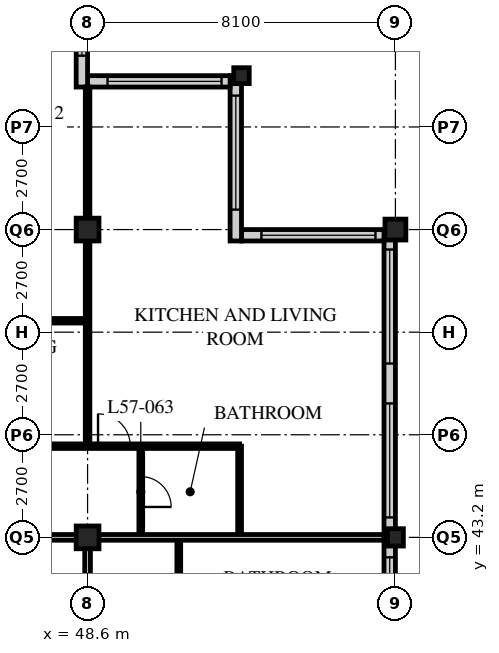
"""IFC4 building model, lengths in metres.
Left out: names, types, materials, properties, quantities, classifications, styles, units other than length and angle.
Written with IfcOpenShell. Run it as: python <this file> out.ifc"""

import sys

from ifc_helpers import new_model, si_unit, direction, frame, frame_2d, origin, origin_2d, place, context, subcontext, project, spatial, rectangle, hollow_rectangle, i_section, extrude, element, fill, save


model = new_model("IFC4")
c1 = context("Model", 3, precision=1e-05, world=origin(), true_north=direction((0.0, 1.0)))
c2 = subcontext(c1, "Body", "Model", "MODEL_VIEW")
j1 = project(units=[si_unit("LENGTHUNIT", "METRE"), si_unit("PLANEANGLEUNIT", "RADIAN")], contexts=[c1])
p1 = place(None, origin())
s1 = spatial("IfcSite", under=j1, at=p1, CompositionType="ELEMENT")
p2 = place(p1, origin())
s2 = spatial("IfcBuilding", under=s1, at=p2, CompositionType="ELEMENT")
p3 = place(p2, frame((0.0, 0.0, 220.8)))
s3 = spatial("IfcBuildingStorey", under=s2, at=p3, CompositionType="ELEMENT", Elevation=220.8)
for number, where, z_axis, x_axis in (
    (1, (48.6, 43.2, 0.0), (0.0, 0.0, 1.0), (1.0, 0.0, 0.0)),
    (2, (48.6, 51.3, 0.0), (0.0, 0.0, 1.0), (1.0, 0.0, 0.0)),
):
    element("IfcColumn", number, at=place(p3, frame(where, z_axis=z_axis, x_axis=x_axis)), inside=s3, PredefinedType="COLUMN", context=c2, shape_type="SweptSolid", body=[
        extrude(hollow_rectangle(XDim=0.6, YDim=0.6, WallThickness=0.05, at=origin_2d()), origin(), (0.0, 0.0, 1.0), 3.6),
    ])
p4 = place(p3, frame((52.65, 55.35, 0.0), z_axis=(0.0, 0.0, 1.0), x_axis=(1.0, 0.0, 0.0)))
e3 = element("IfcColumn", 3, at=p4, inside=s3, PredefinedType="COLUMN", context=c2, shape_type="SweptSolid", body=[
    extrude(i_section(OverallWidth=0.407, OverallDepth=0.419, WebThickness=0.031, FlangeThickness=0.049, FilletRadius=0.015, at=origin_2d()), origin(), (0.0, 0.0, 1.0), 3.6),
])
p5 = place(p3, frame((56.7, 43.2, 0.0), z_axis=(0.0, 0.0, 1.0), x_axis=(1.0, 0.0, 0.0)))
e4 = element("IfcColumn", 4, at=p5, inside=s3, PredefinedType="COLUMN", context=c2, shape_type="SweptSolid", body=[
    extrude(i_section(OverallWidth=0.418, OverallDepth=0.456, WebThickness=0.042, FlangeThickness=0.067, FilletRadius=0.015, at=origin_2d()), origin(), (0.0, 0.0, 1.0), 3.6),
])
p6 = place(p3, frame((56.7, 51.3, 0.0), z_axis=(0.0, 0.0, 1.0), x_axis=(1.0, 0.0, 0.0)))
e5 = element("IfcColumn", 5, at=p6, inside=s3, PredefinedType="COLUMN", context=c2, shape_type="SweptSolid", body=[
    extrude(hollow_rectangle(XDim=0.55, YDim=0.55, WallThickness=0.045, at=origin_2d()), origin(), (0.0, 0.0, 1.0), 3.6),
])
p7 = place(p3, frame((56.55, 19.2, 0.0), z_axis=(0.0, 0.0, 1.0), x_axis=(0.0, 1.0, 0.0)))
e6 = element("IfcWall", 6, at=p7, inside=s3, PredefinedType="SOLIDWALL", context=c2, shape_type="SweptSolid", body=[
    extrude(rectangle(XDim=32.1, YDim=0.3, at=frame_2d((16.05, 0.0))), origin(), (0.0, 0.0, 1.0), 3.39),
])
p8 = place(p7, frame((0.225, 0.0, 0.6)))
e7 = element("IfcOpeningElement", 7, at=p8, cuts=e6, PredefinedType="OPENING", context=c2, shape_type="SweptSolid", body=[
    extrude(rectangle(XDim=3.0, YDim=2.0, at=frame_2d((1.5, 1.0))), frame((0.0, 0.16, 0.0), z_axis=(0.0, -1.0, 0.0), x_axis=(1.0, 0.0, 0.0)), (0.0, 0.0, 1.0), 0.32),
])
p9 = place(p7, frame((4.275, 0.0, 0.6)))
e8 = element("IfcOpeningElement", 8, at=p9, cuts=e6, PredefinedType="OPENING", context=c2, shape_type="SweptSolid", body=[
    extrude(rectangle(XDim=3.0, YDim=2.0, at=frame_2d((1.5, 1.0))), frame((0.0, 0.16, 0.0), z_axis=(0.0, -1.0, 0.0), x_axis=(1.0, 0.0, 0.0)), (0.0, 0.0, 1.0), 0.32),
])
p10 = place(p7, frame((8.325, 0.0, 0.6)))
e9 = element("IfcOpeningElement", 9, at=p10, cuts=e6, PredefinedType="OPENING", context=c2, shape_type="SweptSolid", body=[
    extrude(rectangle(XDim=3.0, YDim=2.0, at=frame_2d((1.5, 1.0))), frame((0.0, 0.16, 0.0), z_axis=(0.0, -1.0, 0.0), x_axis=(1.0, 0.0, 0.0)), (0.0, 0.0, 1.0), 0.32),
])
p11 = place(p7, frame((12.375, 0.0, 0.6)))
e10 = element("IfcOpeningElement", 10, at=p11, cuts=e6, PredefinedType="OPENING", context=c2, shape_type="SweptSolid", body=[
    extrude(rectangle(XDim=3.0, YDim=2.0, at=frame_2d((1.5, 1.0))), frame((0.0, 0.16, 0.0), z_axis=(0.0, -1.0, 0.0), x_axis=(1.0, 0.0, 0.0)), (0.0, 0.0, 1.0), 0.32),
])
p12 = place(p7, frame((16.425, 0.0, 0.6)))
e11 = element("IfcOpeningElement", 11, at=p12, cuts=e6, PredefinedType="OPENING", context=c2, shape_type="SweptSolid", body=[
    extrude(rectangle(XDim=3.0, YDim=2.0, at=frame_2d((1.5, 1.0))), frame((0.0, 0.16, 0.0), z_axis=(0.0, -1.0, 0.0), x_axis=(1.0, 0.0, 0.0)), (0.0, 0.0, 1.0), 0.32),
])
p13 = place(p7, frame((20.475, 0.0, 0.6)))
e12 = element("IfcOpeningElement", 12, at=p13, cuts=e6, PredefinedType="OPENING", context=c2, shape_type="SweptSolid", body=[
    extrude(rectangle(XDim=3.0, YDim=2.0, at=frame_2d((1.5, 1.0))), frame((0.0, 0.16, 0.0), z_axis=(0.0, -1.0, 0.0), x_axis=(1.0, 0.0, 0.0)), (0.0, 0.0, 1.0), 0.32),
])
p14 = place(p7, frame((24.525, 0.0, 0.6)))
e13 = element("IfcOpeningElement", 13, at=p14, cuts=e6, PredefinedType="OPENING", context=c2, shape_type="SweptSolid", body=[
    extrude(rectangle(XDim=3.0, YDim=2.0, at=frame_2d((1.5, 1.0))), frame((0.0, 0.16, 0.0), z_axis=(0.0, -1.0, 0.0), x_axis=(1.0, 0.0, 0.0)), (0.0, 0.0, 1.0), 0.32),
])
p15 = place(p7, frame((28.575, 0.0, 0.6)))
e14 = element("IfcOpeningElement", 14, at=p15, cuts=e6, PredefinedType="OPENING", context=c2, shape_type="SweptSolid", body=[
    extrude(rectangle(XDim=3.0, YDim=2.0, at=frame_2d((1.5, 1.0))), frame((0.0, 0.16, 0.0), z_axis=(0.0, -1.0, 0.0), x_axis=(1.0, 0.0, 0.0)), (0.0, 0.0, 1.0), 0.32),
])
p16 = place(p3, frame((56.4, 51.15, 0.0), z_axis=(0.0, 0.0, 1.0), x_axis=(-1.0, 0.0, 0.0)))
e15 = element("IfcWall", 15, at=p16, inside=s3, PredefinedType="SOLIDWALL", context=c2, shape_type="SweptSolid", body=[
    extrude(rectangle(XDim=3.75, YDim=0.3, at=frame_2d((1.875, 0.0))), origin(), (0.0, 0.0, 1.0), 3.39),
])
p17 = place(p16, frame((0.225, 0.0, 0.6)))
e16 = element("IfcOpeningElement", 16, at=p17, cuts=e15, PredefinedType="OPENING", context=c2, shape_type="SweptSolid", body=[
    extrude(rectangle(XDim=3.0, YDim=2.0, at=frame_2d((1.5, 1.0))), frame((0.0, 0.16, 0.0), z_axis=(0.0, -1.0, 0.0), x_axis=(1.0, 0.0, 0.0)), (0.0, 0.0, 1.0), 0.32),
])
p18 = place(p3, frame((52.5, 51.0, 0.0), z_axis=(0.0, 0.0, 1.0), x_axis=(0.0, 1.0, 0.0)))
e17 = element("IfcWall", 17, at=p18, inside=s3, PredefinedType="SOLIDWALL", context=c2, shape_type="SweptSolid", body=[
    extrude(rectangle(XDim=4.35, YDim=0.3, at=frame_2d((2.175, 0.0))), origin(), (0.0, 0.0, 1.0), 3.39),
])
p19 = place(p18, frame((0.825, 0.0, 0.6)))
e18 = element("IfcOpeningElement", 18, at=p19, cuts=e17, PredefinedType="OPENING", context=c2, shape_type="SweptSolid", body=[
    extrude(rectangle(XDim=3.0, YDim=2.0, at=frame_2d((1.5, 1.0))), frame((0.0, 0.16, 0.0), z_axis=(0.0, -1.0, 0.0), x_axis=(1.0, 0.0, 0.0)), (0.0, 0.0, 1.0), 0.32),
])
p20 = place(p3, frame((52.35, 55.2, 0.0), z_axis=(0.0, 0.0, 1.0), x_axis=(-1.0, 0.0, 0.0)))
e19 = element("IfcWall", 19, at=p20, inside=s3, PredefinedType="SOLIDWALL", context=c2, shape_type="SweptSolid", body=[
    extrude(rectangle(XDim=3.75, YDim=0.3, at=frame_2d((1.875, 0.0))), origin(), (0.0, 0.0, 1.0), 3.39),
])
p21 = place(p20, frame((0.225, 0.0, 0.6)))
e20 = element("IfcOpeningElement", 20, at=p21, cuts=e19, PredefinedType="OPENING", context=c2, shape_type="SweptSolid", body=[
    extrude(rectangle(XDim=3.0, YDim=2.0, at=frame_2d((1.5, 1.0))), frame((0.0, 0.16, 0.0), z_axis=(0.0, -1.0, 0.0), x_axis=(1.0, 0.0, 0.0)), (0.0, 0.0, 1.0), 0.32),
])
p22 = place(p3, frame((48.45, 55.05, 0.0), z_axis=(0.0, 0.0, 1.0), x_axis=(0.0, 1.0, 0.0)))
e21 = element("IfcWall", 21, at=p22, inside=s3, PredefinedType="SOLIDWALL", context=c2, shape_type="SweptSolid", body=[
    extrude(rectangle(XDim=4.35, YDim=0.3, at=frame_2d((2.175, 0.0))), origin(), (0.0, 0.0, 1.0), 3.39),
])
p23 = place(p22, frame((0.825, 0.0, 0.6)))
e22 = element("IfcOpeningElement", 22, at=p23, cuts=e21, PredefinedType="OPENING", context=c2, shape_type="SweptSolid", body=[
    extrude(rectangle(XDim=3.0, YDim=2.0, at=frame_2d((1.5, 1.0))), frame((0.0, 0.16, 0.0), z_axis=(0.0, -1.0, 0.0), x_axis=(1.0, 0.0, 0.0)), (0.0, 0.0, 1.0), 0.32),
])
p24 = place(p3, frame((12.15, 43.2, 0.0), z_axis=(0.0, 0.0, 1.0), x_axis=(1.0, 0.0, 0.0)))
e23 = element("IfcWall", 23, at=p24, inside=s3, PredefinedType="PARTITIONING", context=c2, shape_type="SweptSolid", body=[
    extrude(rectangle(XDim=36.45, YDim=0.15, at=frame_2d((18.225, 0.0))), origin(), (0.0, 0.0, 1.0), 2.628),
])
p25 = place(p24, frame((4.95, 0.0, 0.0)))
e24 = element("IfcOpeningElement", 24, at=p25, cuts=e23, PredefinedType="OPENING", context=c2, shape_type="SweptSolid", body=[
    extrude(rectangle(XDim=1.0, YDim=2.1, at=frame_2d((0.5, 1.05))), frame((0.0, 0.085, 0.0), z_axis=(0.0, -1.0, 0.0), x_axis=(1.0, 0.0, 0.0)), (0.0, 0.0, 1.0), 0.17),
])
p26 = place(p24, frame((25.0, 0.0, 0.0)))
e25 = element("IfcOpeningElement", 25, at=p26, cuts=e23, PredefinedType="OPENING", context=c2, shape_type="SweptSolid", body=[
    extrude(rectangle(XDim=1.0, YDim=2.1, at=frame_2d((0.5, 1.05))), frame((0.0, 0.085, 0.0), z_axis=(0.0, -1.0, 0.0), x_axis=(1.0, 0.0, 0.0)), (0.0, 0.0, 1.0), 0.17),
])
p27 = place(p24, frame((30.7, 0.0, 0.0)))
e26 = element("IfcOpeningElement", 26, at=p27, cuts=e23, PredefinedType="OPENING", context=c2, shape_type="SweptSolid", body=[
    extrude(rectangle(XDim=1.0, YDim=2.1, at=frame_2d((0.5, 1.05))), frame((0.0, 0.085, 0.0), z_axis=(0.0, -1.0, 0.0), x_axis=(1.0, 0.0, 0.0)), (0.0, 0.0, 1.0), 0.17),
])
p28 = place(p24, frame((33.925, 0.0, 0.0)))
e27 = element("IfcOpeningElement", 27, at=p28, cuts=e23, PredefinedType="OPENING", context=c2, shape_type="SweptSolid", body=[
    extrude(rectangle(XDim=1.0, YDim=2.1, at=frame_2d((0.5, 1.05))), frame((0.0, 0.085, 0.0), z_axis=(0.0, -1.0, 0.0), x_axis=(1.0, 0.0, 0.0)), (0.0, 0.0, 1.0), 0.17),
])
p29 = place(p24, frame((1.525, 0.0, 0.0)))
e28 = element("IfcOpeningElement", 28, at=p29, cuts=e23, PredefinedType="OPENING", context=c2, shape_type="SweptSolid", body=[
    extrude(rectangle(XDim=1.0, YDim=2.1, at=frame_2d((0.5, 1.05))), frame((0.0, 0.085, 0.0), z_axis=(0.0, -1.0, 0.0), x_axis=(1.0, 0.0, 0.0)), (0.0, 0.0, 1.0), 0.17),
])
p30 = place(p3, frame((48.6, 18.9, 0.0), z_axis=(0.0, 0.0, 1.0), x_axis=(0.0, 1.0, 0.0)))
e29 = element("IfcWall", 29, at=p30, inside=s3, PredefinedType="PARTITIONING", context=c2, shape_type="SweptSolid", body=[
    extrude(rectangle(XDim=24.3, YDim=0.15, at=frame_2d((12.15, 0.0))), origin(), (0.0, 0.0, 1.0), 2.628),
])
p31 = place(p30, frame((0.9, 0.0, 0.0)))
e30 = element("IfcOpeningElement", 30, at=p31, cuts=e29, PredefinedType="OPENING", context=c2, shape_type="SweptSolid", body=[
    extrude(rectangle(XDim=1.0, YDim=2.1, at=frame_2d((0.5, 1.05))), frame((0.0, 0.085, 0.0), z_axis=(0.0, -1.0, 0.0), x_axis=(1.0, 0.0, 0.0)), (0.0, 0.0, 1.0), 0.17),
])
p32 = place(p30, frame((20.95, 0.0, 0.0)))
e31 = element("IfcOpeningElement", 31, at=p32, cuts=e29, PredefinedType="OPENING", context=c2, shape_type="SweptSolid", body=[
    extrude(rectangle(XDim=1.0, YDim=2.1, at=frame_2d((0.5, 1.05))), frame((0.0, 0.085, 0.0), z_axis=(0.0, -1.0, 0.0), x_axis=(1.0, 0.0, 0.0)), (0.0, 0.0, 1.0), 0.17),
])
p33 = place(p3, frame((51.0, 41.0, 0.0), z_axis=(0.0, 0.0, 1.0), x_axis=(0.0, 1.0, 0.0)))
e32 = element("IfcWall", 32, at=p33, inside=s3, PredefinedType="PARTITIONING", context=c2, shape_type="SweptSolid", body=[
    extrude(rectangle(XDim=2.2, YDim=0.1, at=frame_2d((1.1, 0.0))), origin(), (0.0, 0.0, 1.0), 3.39),
])
p34 = place(p3, frame((44.55, 45.6, 0.0), z_axis=(0.0, 0.0, 1.0), x_axis=(1.0, 0.0, 0.0)))
e33 = element("IfcWall", 33, at=p34, inside=s3, PredefinedType="PARTITIONING", context=c2, shape_type="SweptSolid", body=[
    extrude(rectangle(XDim=8.05, YDim=0.12, at=frame_2d((4.025, 0.0))), origin(), (0.0, 0.0, 1.0), 3.39),
])
p35 = place(p34, frame((0.475, 0.0, 0.0)))
e34 = element("IfcOpeningElement", 34, at=p35, cuts=e33, PredefinedType="OPENING", context=c2, shape_type="SweptSolid", body=[
    extrude(rectangle(XDim=0.85, YDim=2.1, at=frame_2d((0.425, 1.05))), frame((0.0, 0.07, 0.0), z_axis=(0.0, -1.0, 0.0), x_axis=(1.0, 0.0, 0.0)), (0.0, 0.0, 1.0), 0.14),
])
p36 = place(p34, frame((4.325, 0.0, 0.0)))
e35 = element("IfcOpeningElement", 35, at=p36, cuts=e33, PredefinedType="OPENING", context=c2, shape_type="SweptSolid", body=[
    extrude(rectangle(XDim=0.85, YDim=2.1, at=frame_2d((0.425, 1.05))), frame((0.0, 0.07, 0.0), z_axis=(0.0, -1.0, 0.0), x_axis=(1.0, 0.0, 0.0)), (0.0, 0.0, 1.0), 0.14),
])
p37 = place(p3, frame((50.0, 43.2, 0.0), z_axis=(0.0, 0.0, 1.0), x_axis=(0.0, 1.0, 0.0)))
e36 = element("IfcWall", 36, at=p37, inside=s3, PredefinedType="PARTITIONING", context=c2, shape_type="SweptSolid", body=[
    extrude(rectangle(XDim=2.4, YDim=0.1, at=frame_2d((1.2, 0.0))), origin(), (0.0, 0.0, 1.0), 3.39),
])
p38 = place(p37, frame((0.8, 0.0, 0.0)))
e37 = element("IfcOpeningElement", 37, at=p38, cuts=e36, PredefinedType="OPENING", context=c2, shape_type="SweptSolid", body=[
    extrude(rectangle(XDim=0.8, YDim=2.1, at=frame_2d((0.4, 1.05))), frame((0.0, 0.06, 0.0), z_axis=(0.0, -1.0, 0.0), x_axis=(1.0, 0.0, 0.0)), (0.0, 0.0, 1.0), 0.12),
])
p39 = place(p3, frame((52.6, 43.2, 0.0), z_axis=(0.0, 0.0, 1.0), x_axis=(0.0, 1.0, 0.0)))
e38 = element("IfcWall", 38, at=p39, inside=s3, PredefinedType="PARTITIONING", context=c2, shape_type="SweptSolid", body=[
    extrude(rectangle(XDim=2.4, YDim=0.1, at=frame_2d((1.2, 0.0))), origin(), (0.0, 0.0, 1.0), 3.39),
])
p40 = place(p3, frame((48.6, 45.6, 0.0), z_axis=(0.0, 0.0, 1.0), x_axis=(0.0, 1.0, 0.0)))
e39 = element("IfcWall", 39, at=p40, inside=s3, PredefinedType="PARTITIONING", context=c2, shape_type="SweptSolid", body=[
    extrude(rectangle(XDim=9.45, YDim=0.12, at=frame_2d((4.725, 0.0))), origin(), (0.0, 0.0, 1.0), 2.628),
])
p41 = place(p3, frame((48.6, 43.2, 0.0), z_axis=(0.0, 0.0, 1.0), x_axis=(1.0, 0.0, 0.0)))
e40 = element("IfcWall", 40, at=p41, inside=s3, PredefinedType="PARTITIONING", context=c2, shape_type="SweptSolid", body=[
    extrude(rectangle(XDim=7.8, YDim=0.15, at=frame_2d((3.9, 0.0))), origin(), (0.0, 0.0, 1.0), 2.628),
])
p42 = place(p3, frame((44.55, 48.9, 0.0), z_axis=(0.0, 0.0, 1.0), x_axis=(1.0, 0.0, 0.0)))
e41 = element("IfcWall", 41, at=p42, inside=s3, PredefinedType="PARTITIONING", context=c2, shape_type="SweptSolid", body=[
    extrude(rectangle(XDim=4.05, YDim=0.12, at=frame_2d((2.025, 0.0))), origin(), (0.0, 0.0, 1.0), 3.39),
])
p43 = place(p42, frame((1.6, 0.0, 0.0)))
e42 = element("IfcOpeningElement", 42, at=p43, cuts=e41, PredefinedType="OPENING", context=c2, shape_type="SweptSolid", body=[
    extrude(rectangle(XDim=0.85, YDim=2.1, at=frame_2d((0.425, 1.05))), frame((0.0, 0.07, 0.0), z_axis=(0.0, -1.0, 0.0), x_axis=(1.0, 0.0, 0.0)), (0.0, 0.0, 1.0), 0.14),
])
p44 = place(p13, origin())
e43 = element("IfcWindow", 43, at=p44, inside=s3, PartitioningType="SINGLE_PANEL", PredefinedType="WINDOW", context=c2, shape_type="SweptSolid", body=[
    extrude(rectangle(XDim=3.0, YDim=2.0, at=frame_2d((1.5, 1.0))), frame((0.0, 0.03, 0.0), z_axis=(0.0, -1.0, 0.0), x_axis=(1.0, 0.0, 0.0)), (0.0, 0.0, 1.0), 0.06),
])
fill(e12, e43)
p45 = place(p14, origin())
e44 = element("IfcWindow", 44, at=p45, inside=s3, PartitioningType="SINGLE_PANEL", PredefinedType="WINDOW", context=c2, shape_type="SweptSolid", body=[
    extrude(rectangle(XDim=3.0, YDim=2.0, at=frame_2d((1.5, 1.0))), frame((0.0, 0.03, 0.0), z_axis=(0.0, -1.0, 0.0), x_axis=(1.0, 0.0, 0.0)), (0.0, 0.0, 1.0), 0.06),
])
fill(e13, e44)
p46 = place(p15, origin())
e45 = element("IfcWindow", 45, at=p46, inside=s3, PartitioningType="SINGLE_PANEL", PredefinedType="WINDOW", context=c2, shape_type="SweptSolid", body=[
    extrude(rectangle(XDim=3.0, YDim=2.0, at=frame_2d((1.5, 1.0))), frame((0.0, 0.03, 0.0), z_axis=(0.0, -1.0, 0.0), x_axis=(1.0, 0.0, 0.0)), (0.0, 0.0, 1.0), 0.06),
])
fill(e14, e45)
p47 = place(p17, origin())
e46 = element("IfcWindow", 46, at=p47, inside=s3, PartitioningType="SINGLE_PANEL", PredefinedType="WINDOW", context=c2, shape_type="SweptSolid", body=[
    extrude(rectangle(XDim=3.0, YDim=2.0, at=frame_2d((1.5, 1.0))), frame((0.0, 0.03, 0.0), z_axis=(0.0, -1.0, 0.0), x_axis=(1.0, 0.0, 0.0)), (0.0, 0.0, 1.0), 0.06),
])
fill(e16, e46)
p48 = place(p19, origin())
e47 = element("IfcWindow", 47, at=p48, inside=s3, PartitioningType="SINGLE_PANEL", PredefinedType="WINDOW", context=c2, shape_type="SweptSolid", body=[
    extrude(rectangle(XDim=3.0, YDim=2.0, at=frame_2d((1.5, 1.0))), frame((0.0, 0.03, 0.0), z_axis=(0.0, -1.0, 0.0), x_axis=(1.0, 0.0, 0.0)), (0.0, 0.0, 1.0), 0.06),
])
fill(e18, e47)
p49 = place(p21, origin())
e48 = element("IfcWindow", 48, at=p49, inside=s3, PartitioningType="SINGLE_PANEL", PredefinedType="WINDOW", context=c2, shape_type="SweptSolid", body=[
    extrude(rectangle(XDim=3.0, YDim=2.0, at=frame_2d((1.5, 1.0))), frame((0.0, 0.03, 0.0), z_axis=(0.0, -1.0, 0.0), x_axis=(1.0, 0.0, 0.0)), (0.0, 0.0, 1.0), 0.06),
])
fill(e20, e48)
p50 = place(p23, origin())
e49 = element("IfcWindow", 49, at=p50, inside=s3, PartitioningType="SINGLE_PANEL", PredefinedType="WINDOW", context=c2, shape_type="SweptSolid", body=[
    extrude(rectangle(XDim=3.0, YDim=2.0, at=frame_2d((1.5, 1.0))), frame((0.0, 0.03, 0.0), z_axis=(0.0, -1.0, 0.0), x_axis=(1.0, 0.0, 0.0)), (0.0, 0.0, 1.0), 0.06),
])
fill(e22, e49)
p51 = place(p38, origin())
e50 = element("IfcDoor", 50, at=p51, inside=s3, OperationType="SINGLE_SWING_RIGHT", PredefinedType="DOOR", context=c2, shape_type="SweptSolid", body=[
    extrude(rectangle(XDim=0.8, YDim=2.1, at=frame_2d((0.4, 1.05))), frame((0.0, 0.025, 0.0), z_axis=(0.0, -1.0, 0.0), x_axis=(1.0, 0.0, 0.0)), (0.0, 0.0, 1.0), 0.05),
])
fill(e37, e50)
p52 = place(p36, origin())
e51 = element("IfcDoor", 51, at=p52, inside=s3, OperationType="SINGLE_SWING_LEFT", PredefinedType="DOOR", context=c2, shape_type="SweptSolid", body=[
    extrude(rectangle(XDim=0.85, YDim=2.1, at=frame_2d((0.425, 1.05))), frame((0.0, 0.025, 0.0), z_axis=(0.0, -1.0, 0.0), x_axis=(1.0, 0.0, 0.0)), (0.0, 0.0, 1.0), 0.05),
])
fill(e35, e51)
save(model, sys.argv[1])
